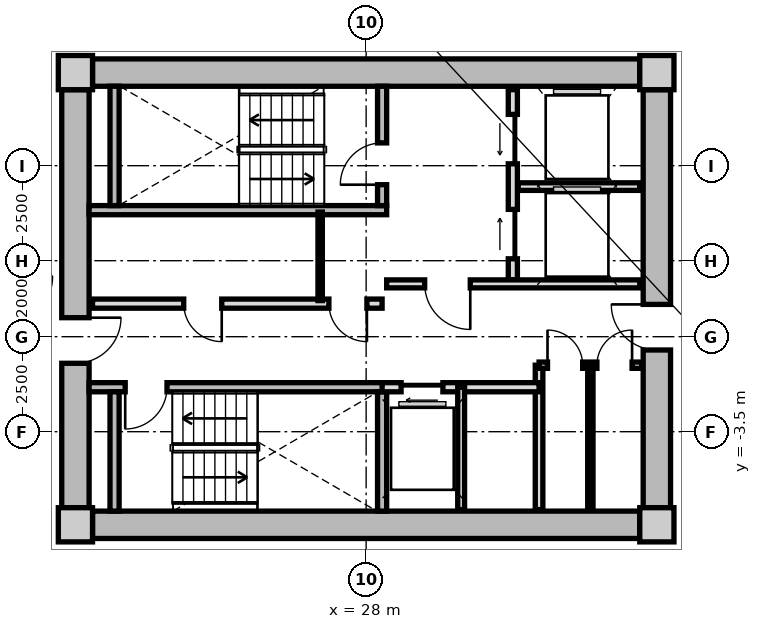
"""IFC4 building model, lengths in metres.
Left out: names, types, materials, properties, quantities, classifications, styles, units other than length and angle.
Written with IfcOpenShell. Run it as: python <this file> out.ifc"""

import sys

from ifc_helpers import new_model, si_unit, direction, frame, frame_2d, origin, origin_2d, place, context, subcontext, project, spatial, rectangle, extrude, source, transform, mapped, element, fill, save


model = new_model("IFC4")
c1 = context("Model", 3, precision=1e-05, world=origin(), true_north=direction((0.0, 1.0)))
c2 = subcontext(c1, "Body", "Model", "MODEL_VIEW")
j1 = project(units=[si_unit("LENGTHUNIT", "METRE"), si_unit("PLANEANGLEUNIT", "RADIAN")], contexts=[c1])
p1 = place(None, origin())
s1 = spatial("IfcSite", under=j1, at=p1, CompositionType="ELEMENT")
p2 = place(p1, origin())
s2 = spatial("IfcBuilding", under=s1, at=p2, CompositionType="ELEMENT")
p3 = place(p2, frame((0.0, 0.0, 90.15)))
s3 = spatial("IfcBuildingStorey", under=s2, at=p3, CompositionType="ELEMENT", Elevation=90.15)
m1 = source(origin(), c2, "Body", "SweptSolid", [
    extrude(rectangle(XDim=0.9, YDim=0.9, at=origin_2d()), origin(), (0.0, 0.0, 1.0), 3.05),
])
for number, where, z_axis, x_axis in (
    (1, (20.35, -5.95, 0.0), (0.0, 0.0, 1.0), (1.0, 0.0, 0.0)),
    (2, (35.65, -5.95, 0.0), (0.0, 0.0, 1.0), (1.0, 0.0, 0.0)),
    (3, (35.65, 5.95, 0.0), (0.0, 0.0, 1.0), (1.0, 0.0, 0.0)),
    (4, (20.35, 5.95, 0.0), (0.0, 0.0, 1.0), (1.0, 0.0, 0.0)),
):
    element("IfcColumn", number, at=place(p3, frame(where, z_axis=z_axis, x_axis=x_axis)), inside=s3, PredefinedType="COLUMN", context=c2, shape_type="MappedRepresentation", body=[
        mapped(m1, transform((0.0, 0.0, 0.0), x_axis=(1.0, 0.0, 0.0), y_axis=(0.0, 1.0, 0.0), z_axis=(0.0, 0.0, 1.0), scale=1.0)),
    ])
m2 = source(origin(), c2, "Body", "SweptSolid", [
    extrude(rectangle(XDim=14.4, YDim=0.72, at=frame_2d((7.2, 0.0))), origin(), (0.0, 0.0, 1.0), 2.79),
])
for number, where, z_axis, x_axis in (
    (5, (20.8, 5.95, 0.0), (0.0, 0.0, 1.0), (1.0, 0.0, 0.0)),
    (6, (35.2, -5.95, 0.0), (0.0, 0.0, 1.0), (-1.0, 0.0, 0.0)),
):
    element("IfcWall", number, at=place(p3, frame(where, z_axis=z_axis, x_axis=x_axis)), inside=s3, PredefinedType="SHEAR", context=c2, shape_type="MappedRepresentation", body=[
        mapped(m2, transform((0.0, 0.0, 0.0), x_axis=(1.0, 0.0, 0.0), y_axis=(0.0, 1.0, 0.0), z_axis=(0.0, 0.0, 1.0), scale=1.0)),
    ])
m3 = source(origin(), c2, "Body", "SweptSolid", [
    extrude(rectangle(XDim=11.0, YDim=0.72, at=frame_2d((5.5, 0.0))), origin(), (0.0, 0.0, 1.0), 2.79),
])
p4 = place(p3, frame((20.35, -5.5, 0.0), z_axis=(0.0, 0.0, 1.0), x_axis=(0.0, 1.0, 0.0)))
e7 = element("IfcWall", 7, at=p4, inside=s3, PredefinedType="SHEAR", context=c2, shape_type="MappedRepresentation", body=[
    mapped(m3, transform((0.0, 0.0, 0.0), x_axis=(1.0, 0.0, 0.0), y_axis=(0.0, 1.0, 0.0), z_axis=(0.0, 0.0, 1.0), scale=1.0)),
])
p5 = place(p4, frame((3.8, 0.0, 0.0)))
e8 = element("IfcOpeningElement", 8, at=p5, cuts=e7, PredefinedType="OPENING", context=c2, shape_type="SweptSolid", body=[
    extrude(rectangle(XDim=1.2, YDim=2.15, at=frame_2d((0.6, 1.075))), frame((0.0, 0.37, 0.0), z_axis=(0.0, -1.0, 0.0), x_axis=(1.0, 0.0, 0.0)), (0.0, 0.0, 1.0), 0.74),
])
p6 = place(p3, frame((35.65, 5.5, 0.0), z_axis=(0.0, 0.0, 1.0), x_axis=(0.0, -1.0, 0.0)))
e9 = element("IfcWall", 9, at=p6, inside=s3, PredefinedType="SHEAR", context=c2, shape_type="MappedRepresentation", body=[
    mapped(m3, transform((0.0, 0.0, 0.0), x_axis=(1.0, 0.0, 0.0), y_axis=(0.0, 1.0, 0.0), z_axis=(0.0, 0.0, 1.0), scale=1.0)),
])
p7 = place(p6, frame((5.65, 0.0, 0.0)))
e10 = element("IfcOpeningElement", 10, at=p7, cuts=e9, PredefinedType="OPENING", context=c2, shape_type="SweptSolid", body=[
    extrude(rectangle(XDim=1.2, YDim=2.15, at=frame_2d((0.6, 1.075))), frame((0.0, 0.37, 0.0), z_axis=(0.0, -1.0, 0.0), x_axis=(1.0, 0.0, 0.0)), (0.0, 0.0, 1.0), 0.74),
])
m4 = source(origin(), c2, "Body", "SweptSolid", [
    extrude(rectangle(XDim=7.83, YDim=0.24, at=frame_2d((3.915, 0.0))), origin(), (0.0, 0.0, 1.0), 2.79),
])
p8 = place(p3, frame((20.71, 2.33, 0.0), z_axis=(0.0, 0.0, 1.0), x_axis=(1.0, 0.0, 0.0)))
e11 = element("IfcWall", 11, at=p8, inside=s3, PredefinedType="PARTITIONING", context=c2, shape_type="MappedRepresentation", body=[
    mapped(m4, transform((0.0, 0.0, 0.0), x_axis=(1.0, 0.0, 0.0), y_axis=(0.0, 1.0, 0.0), z_axis=(0.0, 0.0, 1.0), scale=1.0)),
])
m5 = source(origin(), c2, "Body", "SweptSolid", [
    extrude(rectangle(XDim=3.14, YDim=0.24, at=frame_2d((1.57, 0.0))), origin(), (0.0, 0.0, 1.0), 2.79),
])
p9 = place(p3, frame((21.38, 2.45, 0.0), z_axis=(0.0, 0.0, 1.0), x_axis=(0.0, 1.0, 0.0)))
e12 = element("IfcWall", 12, at=p9, inside=s3, PredefinedType="PARTITIONING", context=c2, shape_type="MappedRepresentation", body=[
    mapped(m5, transform((0.0, 0.0, 0.0), x_axis=(1.0, 0.0, 0.0), y_axis=(0.0, 1.0, 0.0), z_axis=(0.0, 0.0, 1.0), scale=1.0)),
])
p10 = place(p3, frame((28.42, 2.45, 0.0), z_axis=(0.0, 0.0, 1.0), x_axis=(0.0, 1.0, 0.0)))
e13 = element("IfcWall", 13, at=p10, inside=s3, PredefinedType="PARTITIONING", context=c2, shape_type="MappedRepresentation", body=[
    mapped(m5, transform((0.0, 0.0, 0.0), x_axis=(1.0, 0.0, 0.0), y_axis=(0.0, 1.0, 0.0), z_axis=(0.0, 0.0, 1.0), scale=1.0)),
])
p11 = place(p10, frame((0.55, 0.0, 0.0)))
e14 = element("IfcOpeningElement", 14, at=p11, cuts=e13, PredefinedType="OPENING", context=c2, shape_type="SweptSolid", body=[
    extrude(rectangle(XDim=1.1, YDim=2.15, at=frame_2d((0.55, 1.075))), frame((0.0, 0.13, 0.0), z_axis=(0.0, -1.0, 0.0), x_axis=(1.0, 0.0, 0.0)), (0.0, 0.0, 1.0), 0.26),
])
p12 = place(p3, frame((20.71, -2.33, 0.0), z_axis=(0.0, 0.0, 1.0), x_axis=(1.0, 0.0, 0.0)))
e15 = element("IfcWall", 15, at=p12, inside=s3, PredefinedType="PARTITIONING", context=c2, shape_type="MappedRepresentation", body=[
    mapped(m4, transform((0.0, 0.0, 0.0), x_axis=(1.0, 0.0, 0.0), y_axis=(0.0, 1.0, 0.0), z_axis=(0.0, 0.0, 1.0), scale=1.0)),
])
p13 = place(p12, frame((0.95, 0.0, 0.0)))
e16 = element("IfcOpeningElement", 16, at=p13, cuts=e15, PredefinedType="OPENING", context=c2, shape_type="SweptSolid", body=[
    extrude(rectangle(XDim=1.1, YDim=2.15, at=frame_2d((0.55, 1.075))), frame((0.0, 0.13, 0.0), z_axis=(0.0, -1.0, 0.0), x_axis=(1.0, 0.0, 0.0)), (0.0, 0.0, 1.0), 0.26),
])
for number, where, z_axis, x_axis in (
    (17, (21.38, -5.59, 0.0), (0.0, 0.0, 1.0), (0.0, 1.0, 0.0)),
    (18, (28.42, -5.59, 0.0), (0.0, 0.0, 1.0), (0.0, 1.0, 0.0)),
):
    element("IfcWall", number, at=place(p3, frame(where, z_axis=z_axis, x_axis=x_axis)), inside=s3, PredefinedType="PARTITIONING", context=c2, shape_type="MappedRepresentation", body=[
        mapped(m5, transform((0.0, 0.0, 0.0), x_axis=(1.0, 0.0, 0.0), y_axis=(0.0, 1.0, 0.0), z_axis=(0.0, 0.0, 1.0), scale=1.0)),
    ])
m6 = source(origin(), c2, "Body", "SweptSolid", [
    extrude(rectangle(XDim=5.0, YDim=0.24, at=frame_2d((2.5, 0.0))), origin(), (0.0, 0.0, 1.0), 2.775),
])
p14 = place(p3, frame((31.86, 0.5, 0.0), z_axis=(0.0, 0.0, 1.0), x_axis=(0.0, 1.0, 0.0)))
e19 = element("IfcWall", 19, at=p14, inside=s3, PredefinedType="PARTITIONING", context=c2, shape_type="MappedRepresentation", body=[
    mapped(m6, transform((0.0, 0.0, 0.0), x_axis=(1.0, 0.0, 0.0), y_axis=(0.0, 1.0, 0.0), z_axis=(0.0, 0.0, 1.0), scale=1.0)),
])
p15 = place(p14, frame((3.05, 0.0, 0.0)))
e20 = element("IfcOpeningElement", 20, at=p15, cuts=e19, PredefinedType="OPENING", context=c2, shape_type="SweptSolid", body=[
    extrude(rectangle(XDim=1.3, YDim=2.2, at=frame_2d((0.65, 1.1))), frame((0.0, 0.13, 0.0), z_axis=(0.0, -1.0, 0.0), x_axis=(1.0, 0.0, 0.0)), (0.0, 0.0, 1.0), 0.26),
])
p16 = place(p14, frame((0.55, 0.0, 0.0)))
e21 = element("IfcOpeningElement", 21, at=p16, cuts=e19, PredefinedType="OPENING", context=c2, shape_type="SweptSolid", body=[
    extrude(rectangle(XDim=1.3, YDim=2.2, at=frame_2d((0.65, 1.1))), frame((0.0, 0.13, 0.0), z_axis=(0.0, -1.0, 0.0), x_axis=(1.0, 0.0, 0.0)), (0.0, 0.0, 1.0), 0.26),
])
m7 = source(origin(), c2, "Body", "SweptSolid", [
    extrude(rectangle(XDim=3.2, YDim=0.2, at=frame_2d((1.6, 0.0))), origin(), (0.0, 0.0, 1.0), 2.775),
])
p17 = place(p3, frame((32.0, 2.95, 0.0), z_axis=(0.0, 0.0, 1.0), x_axis=(1.0, 0.0, 0.0)))
e22 = element("IfcWall", 22, at=p17, inside=s3, PredefinedType="PARTITIONING", context=c2, shape_type="MappedRepresentation", body=[
    mapped(m7, transform((0.0, 0.0, 0.0), x_axis=(1.0, 0.0, 0.0), y_axis=(0.0, 1.0, 0.0), z_axis=(0.0, 0.0, 1.0), scale=1.0)),
])
m8 = source(origin(), c2, "Body", "SweptSolid", [
    extrude(rectangle(XDim=6.66, YDim=0.21, at=frame_2d((3.33, 0.0))), origin(), (0.0, 0.0, 1.0), 2.775),
])
p18 = place(p3, frame((28.54, 0.39, 0.0), z_axis=(0.0, 0.0, 1.0), x_axis=(1.0, 0.0, 0.0)))
e23 = element("IfcWall", 23, at=p18, inside=s3, PredefinedType="PARTITIONING", context=c2, shape_type="MappedRepresentation", body=[
    mapped(m8, transform((0.0, 0.0, 0.0), x_axis=(1.0, 0.0, 0.0), y_axis=(0.0, 1.0, 0.0), z_axis=(0.0, 0.0, 1.0), scale=1.0)),
])
p19 = place(p18, frame((1.0, 0.0, 0.0)))
e24 = element("IfcOpeningElement", 24, at=p19, cuts=e23, PredefinedType="OPENING", context=c2, shape_type="SweptSolid", body=[
    extrude(rectangle(XDim=1.2, YDim=2.15, at=frame_2d((0.6, 1.075))), frame((0.0, 0.115, 0.0), z_axis=(0.0, -1.0, 0.0), x_axis=(1.0, 0.0, 0.0)), (0.0, 0.0, 1.0), 0.23),
])
m9 = source(origin(), c2, "Body", "SweptSolid", [
    extrude(rectangle(XDim=7.62, YDim=0.24, at=frame_2d((3.81, 0.0))), origin(), (0.0, 0.0, 1.0), 2.775),
])
p20 = place(p3, frame((20.8, -0.13, 0.0), z_axis=(0.0, 0.0, 1.0), x_axis=(1.0, 0.0, 0.0)))
e25 = element("IfcWall", 25, at=p20, inside=s3, PredefinedType="PARTITIONING", context=c2, shape_type="MappedRepresentation", body=[
    mapped(m9, transform((0.0, 0.0, 0.0), x_axis=(1.0, 0.0, 0.0), y_axis=(0.0, 1.0, 0.0), z_axis=(0.0, 0.0, 1.0), scale=1.0)),
])
p21 = place(p20, frame((6.22, 0.0, 0.0)))
e26 = element("IfcOpeningElement", 26, at=p21, cuts=e25, PredefinedType="OPENING", context=c2, shape_type="SweptSolid", body=[
    extrude(rectangle(XDim=1.0, YDim=2.1, at=frame_2d((0.5, 1.05))), frame((0.0, 0.13, 0.0), z_axis=(0.0, -1.0, 0.0), x_axis=(1.0, 0.0, 0.0)), (0.0, 0.0, 1.0), 0.26),
])
p22 = place(p20, frame((2.4, 0.0, 0.0)))
e27 = element("IfcOpeningElement", 27, at=p22, cuts=e25, PredefinedType="OPENING", context=c2, shape_type="SweptSolid", body=[
    extrude(rectangle(XDim=1.0, YDim=2.1, at=frame_2d((0.5, 1.05))), frame((0.0, 0.13, 0.0), z_axis=(0.0, -1.0, 0.0), x_axis=(1.0, 0.0, 0.0)), (0.0, 0.0, 1.0), 0.26),
])
m10 = source(origin(), c2, "Body", "SweptSolid", [
    extrude(rectangle(XDim=2.33, YDim=0.115, at=frame_2d((1.165, 0.0))), origin(), (0.0, 0.0, 1.0), 2.775),
])
p23 = place(p3, frame((26.79, -0.05, 0.0), z_axis=(0.0, 0.0, 1.0), x_axis=(0.0, 1.0, 0.0)))
e28 = element("IfcWall", 28, at=p23, inside=s3, PredefinedType="PARTITIONING", context=c2, shape_type="MappedRepresentation", body=[
    mapped(m10, transform((0.0, 0.0, 0.0), x_axis=(1.0, 0.0, 0.0), y_axis=(0.0, 1.0, 0.0), z_axis=(0.0, 0.0, 1.0), scale=1.0)),
])
m11 = source(origin(), c2, "Body", "SweptSolid", [
    extrude(rectangle(XDim=3.8, YDim=0.2, at=frame_2d((1.9, 0.0))), origin(), (0.0, 0.0, 1.0), 2.775),
])
p24 = place(p3, frame((32.55, -5.55, 0.0), z_axis=(0.0, 0.0, 1.0), x_axis=(0.0, 1.0, 0.0)))
e29 = element("IfcWall", 29, at=p24, inside=s3, PredefinedType="PARTITIONING", context=c2, shape_type="MappedRepresentation", body=[
    mapped(m11, transform((0.0, 0.0, 0.0), x_axis=(1.0, 0.0, 0.0), y_axis=(0.0, 1.0, 0.0), z_axis=(0.0, 0.0, 1.0), scale=1.0)),
])
m12 = source(origin(), c2, "Body", "SweptSolid", [
    extrude(rectangle(XDim=4.13, YDim=0.24, at=frame_2d((2.065, 0.0))), origin(), (0.0, 0.0, 1.0), 2.775),
])
p25 = place(p3, frame((28.42, -2.33, 0.0), z_axis=(0.0, 0.0, 1.0), x_axis=(1.0, 0.0, 0.0)))
e30 = element("IfcWall", 30, at=p25, inside=s3, PredefinedType="PARTITIONING", context=c2, shape_type="MappedRepresentation", body=[
    mapped(m12, transform((0.0, 0.0, 0.0), x_axis=(1.0, 0.0, 0.0), y_axis=(0.0, 1.0, 0.0), z_axis=(0.0, 0.0, 1.0), scale=1.0)),
])
p26 = place(p25, frame((0.5, 0.0, 0.0)))
e31 = element("IfcOpeningElement", 31, at=p26, cuts=e30, PredefinedType="OPENING", context=c2, shape_type="SweptSolid", body=[
    extrude(rectangle(XDim=1.1, YDim=2.2, at=frame_2d((0.55, 1.1))), frame((0.0, 0.13, 0.0), z_axis=(0.0, -1.0, 0.0), x_axis=(1.0, 0.0, 0.0)), (0.0, 0.0, 1.0), 0.26),
])
m13 = source(origin(), c2, "Body", "SweptSolid", [
    extrude(rectangle(XDim=3.22, YDim=0.18, at=frame_2d((1.61, 0.0))), origin(), (0.0, 0.0, 1.0), 2.775),
])
p27 = place(p3, frame((30.5, -5.55, 0.0), z_axis=(0.0, 0.0, 1.0), x_axis=(0.0, 1.0, 0.0)))
e32 = element("IfcWall", 32, at=p27, inside=s3, PredefinedType="PARTITIONING", context=c2, shape_type="MappedRepresentation", body=[
    mapped(m13, transform((0.0, 0.0, 0.0), x_axis=(1.0, 0.0, 0.0), y_axis=(0.0, 1.0, 0.0), z_axis=(0.0, 0.0, 1.0), scale=1.0)),
])
m14 = source(origin(), c2, "Body", "SweptSolid", [
    extrude(rectangle(XDim=2.7, YDim=0.165, at=frame_2d((1.35, 0.0))), origin(), (0.0, 0.0, 1.0), 2.775),
])
p28 = place(p3, frame((32.55, -1.75, 0.0), z_axis=(0.0, 0.0, 1.0), x_axis=(1.0, 0.0, 0.0)))
e33 = element("IfcWall", 33, at=p28, inside=s3, PredefinedType="PARTITIONING", context=c2, shape_type="MappedRepresentation", body=[
    mapped(m14, transform((0.0, 0.0, 0.0), x_axis=(1.0, 0.0, 0.0), y_axis=(0.0, 1.0, 0.0), z_axis=(0.0, 0.0, 1.0), scale=1.0)),
])
p29 = place(p28, frame((0.222, 0.0, 0.0)))
e34 = element("IfcOpeningElement", 34, at=p29, cuts=e33, PredefinedType="OPENING", context=c2, shape_type="SweptSolid", body=[
    extrude(rectangle(XDim=0.925, YDim=2.1, at=frame_2d((0.462, 1.05))), frame((0.0, 0.093, 0.0), z_axis=(0.0, -1.0, 0.0), x_axis=(1.0, 0.0, 0.0)), (0.0, 0.0, 1.0), 0.185),
])
p30 = place(p28, frame((1.522, 0.0, 0.0)))
e35 = element("IfcOpeningElement", 35, at=p30, cuts=e33, PredefinedType="OPENING", context=c2, shape_type="SweptSolid", body=[
    extrude(rectangle(XDim=0.925, YDim=2.1, at=frame_2d((0.462, 1.05))), frame((0.0, 0.093, 0.0), z_axis=(0.0, -1.0, 0.0), x_axis=(1.0, 0.0, 0.0)), (0.0, 0.0, 1.0), 0.185),
])
m15 = source(origin(), c2, "Body", "SweptSolid", [
    extrude(rectangle(XDim=3.8, YDim=0.14, at=frame_2d((1.9, 0.0))), origin(), (0.0, 0.0, 1.0), 2.775),
])
p31 = place(p3, frame((33.9, -5.55, 0.0), z_axis=(0.0, 0.0, 1.0), x_axis=(0.0, 1.0, 0.0)))
e36 = element("IfcWall", 36, at=p31, inside=s3, PredefinedType="PARTITIONING", context=c2, shape_type="MappedRepresentation", body=[
    mapped(m15, transform((0.0, 0.0, 0.0), x_axis=(1.0, 0.0, 0.0), y_axis=(0.0, 1.0, 0.0), z_axis=(0.0, 0.0, 1.0), scale=1.0)),
])
m16 = source(origin(), c2, "Body", "SweptSolid", [
    extrude(rectangle(XDim=1.1, YDim=2.15, at=frame_2d((0.55, 1.075))), frame((0.0, 0.025, 0.0), z_axis=(0.0, -1.0, 0.0), x_axis=(1.0, 0.0, 0.0)), (0.0, 0.0, 1.0), 0.05),
])
p32 = place(p11, origin())
e37 = element("IfcDoor", 37, at=p32, inside=s3, OperationType="SINGLE_SWING_LEFT", PredefinedType="DOOR", context=c2, shape_type="MappedRepresentation", body=[
    mapped(m16, transform((0.0, 0.0, 0.0), x_axis=(1.0, 0.0, 0.0), y_axis=(0.0, 1.0, 0.0), z_axis=(0.0, 0.0, 1.0), scale=1.0)),
])
fill(e14, e37)
p33 = place(p13, frame((1.1, 0.0, 0.0), z_axis=(0.0, 0.0, 1.0), x_axis=(-1.0, 0.0, 0.0)))
e38 = element("IfcDoor", 38, at=p33, inside=s3, OperationType="SINGLE_SWING_RIGHT", PredefinedType="DOOR", context=c2, shape_type="MappedRepresentation", body=[
    mapped(m16, transform((0.0, 0.0, 0.0), x_axis=(1.0, 0.0, 0.0), y_axis=(0.0, 1.0, 0.0), z_axis=(0.0, 0.0, 1.0), scale=1.0)),
])
fill(e16, e38)
m17 = source(origin(), c2, "Body", "SweptSolid", [
    extrude(rectangle(XDim=1.3, YDim=2.2, at=frame_2d((0.65, 1.1))), frame((0.0, 0.025, 0.0), z_axis=(0.0, -1.0, 0.0), x_axis=(1.0, 0.0, 0.0)), (0.0, 0.0, 1.0), 0.05),
])
p34 = place(p15, origin())
e39 = element("IfcDoor", 39, at=p34, inside=s3, OperationType="SLIDING_TO_LEFT", PredefinedType="DOOR", context=c2, shape_type="MappedRepresentation", body=[
    mapped(m17, transform((0.0, 0.0, 0.0), x_axis=(1.0, 0.0, 0.0), y_axis=(0.0, 1.0, 0.0), z_axis=(0.0, 0.0, 1.0), scale=1.0)),
])
fill(e20, e39)
p35 = place(p16, origin())
e40 = element("IfcDoor", 40, at=p35, inside=s3, OperationType="SLIDING_TO_RIGHT", PredefinedType="DOOR", context=c2, shape_type="MappedRepresentation", body=[
    mapped(m17, transform((0.0, 0.0, 0.0), x_axis=(1.0, 0.0, 0.0), y_axis=(0.0, 1.0, 0.0), z_axis=(0.0, 0.0, 1.0), scale=1.0)),
])
fill(e21, e40)
m18 = source(origin(), c2, "Body", "SweptSolid", [
    extrude(rectangle(XDim=1.2, YDim=2.15, at=frame_2d((0.6, 1.075))), frame((0.0, 0.025, 0.0), z_axis=(0.0, -1.0, 0.0), x_axis=(1.0, 0.0, 0.0)), (0.0, 0.0, 1.0), 0.05),
])
p36 = place(p19, frame((1.2, 0.0, 0.0), z_axis=(0.0, 0.0, 1.0), x_axis=(-1.0, 0.0, 0.0)))
e41 = element("IfcDoor", 41, at=p36, inside=s3, OperationType="SINGLE_SWING_LEFT", PredefinedType="DOOR", context=c2, shape_type="MappedRepresentation", body=[
    mapped(m18, transform((0.0, 0.0, 0.0), x_axis=(1.0, 0.0, 0.0), y_axis=(0.0, 1.0, 0.0), z_axis=(0.0, 0.0, 1.0), scale=1.0)),
])
fill(e24, e41)
p37 = place(p5, frame((1.2, 0.0, 0.0), z_axis=(0.0, 0.0, 1.0), x_axis=(-1.0, 0.0, 0.0)))
e42 = element("IfcDoor", 42, at=p37, inside=s3, OperationType="SINGLE_SWING_LEFT", PredefinedType="DOOR", context=c2, shape_type="MappedRepresentation", body=[
    mapped(m18, transform((0.0, 0.0, 0.0), x_axis=(1.0, 0.0, 0.0), y_axis=(0.0, 1.0, 0.0), z_axis=(0.0, 0.0, 1.0), scale=1.0)),
])
fill(e8, e42)
p38 = place(p7, frame((1.2, 0.0, 0.0), z_axis=(0.0, 0.0, 1.0), x_axis=(-1.0, 0.0, 0.0)))
e43 = element("IfcDoor", 43, at=p38, inside=s3, OperationType="SINGLE_SWING_RIGHT", PredefinedType="DOOR", context=c2, shape_type="MappedRepresentation", body=[
    mapped(m18, transform((0.0, 0.0, 0.0), x_axis=(1.0, 0.0, 0.0), y_axis=(0.0, 1.0, 0.0), z_axis=(0.0, 0.0, 1.0), scale=1.0)),
])
fill(e10, e43)
m19 = source(origin(), c2, "Body", "SweptSolid", [
    extrude(rectangle(XDim=1.0, YDim=2.1, at=frame_2d((0.5, 1.05))), frame((0.0, 0.025, 0.0), z_axis=(0.0, -1.0, 0.0), x_axis=(1.0, 0.0, 0.0)), (0.0, 0.0, 1.0), 0.05),
])
p39 = place(p21, frame((1.0, 0.0, 0.0), z_axis=(0.0, 0.0, 1.0), x_axis=(-1.0, 0.0, 0.0)))
e44 = element("IfcDoor", 44, at=p39, inside=s3, OperationType="SINGLE_SWING_LEFT", PredefinedType="DOOR", context=c2, shape_type="MappedRepresentation", body=[
    mapped(m19, transform((0.0, 0.0, 0.0), x_axis=(1.0, 0.0, 0.0), y_axis=(0.0, 1.0, 0.0), z_axis=(0.0, 0.0, 1.0), scale=1.0)),
])
fill(e26, e44)
p40 = place(p22, frame((1.0, 0.0, 0.0), z_axis=(0.0, 0.0, 1.0), x_axis=(-1.0, 0.0, 0.0)))
e45 = element("IfcDoor", 45, at=p40, inside=s3, OperationType="SINGLE_SWING_LEFT", PredefinedType="DOOR", context=c2, shape_type="MappedRepresentation", body=[
    mapped(m19, transform((0.0, 0.0, 0.0), x_axis=(1.0, 0.0, 0.0), y_axis=(0.0, 1.0, 0.0), z_axis=(0.0, 0.0, 1.0), scale=1.0)),
])
fill(e27, e45)
m20 = source(origin(), c2, "Body", "SweptSolid", [
    extrude(rectangle(XDim=1.1, YDim=2.2, at=frame_2d((0.55, 1.1))), frame((0.0, 0.025, 0.0), z_axis=(0.0, -1.0, 0.0), x_axis=(1.0, 0.0, 0.0)), (0.0, 0.0, 1.0), 0.05),
])
p41 = place(p26, frame((1.1, 0.0, 0.0), z_axis=(0.0, 0.0, 1.0), x_axis=(-1.0, 0.0, 0.0)))
e46 = element("IfcDoor", 46, at=p41, inside=s3, OperationType="SLIDING_TO_LEFT", PredefinedType="DOOR", context=c2, shape_type="MappedRepresentation", body=[
    mapped(m20, transform((0.0, 0.0, 0.0), x_axis=(1.0, 0.0, 0.0), y_axis=(0.0, 1.0, 0.0), z_axis=(0.0, 0.0, 1.0), scale=1.0)),
])
fill(e31, e46)
m21 = source(origin(), c2, "Body", "SweptSolid", [
    extrude(rectangle(XDim=0.925, YDim=2.1, at=frame_2d((0.462, 1.05))), frame((0.0, 0.025, 0.0), z_axis=(0.0, -1.0, 0.0), x_axis=(1.0, 0.0, 0.0)), (0.0, 0.0, 1.0), 0.05),
])
p42 = place(p29, origin())
e47 = element("IfcDoor", 47, at=p42, inside=s3, OperationType="SINGLE_SWING_LEFT", PredefinedType="DOOR", context=c2, shape_type="MappedRepresentation", body=[
    mapped(m21, transform((0.0, 0.0, 0.0), x_axis=(1.0, 0.0, 0.0), y_axis=(0.0, 1.0, 0.0), z_axis=(0.0, 0.0, 1.0), scale=1.0)),
])
fill(e34, e47)
p43 = place(p30, origin())
e48 = element("IfcDoor", 48, at=p43, inside=s3, OperationType="SINGLE_SWING_RIGHT", PredefinedType="DOOR", context=c2, shape_type="MappedRepresentation", body=[
    mapped(m21, transform((0.0, 0.0, 0.0), x_axis=(1.0, 0.0, 0.0), y_axis=(0.0, 1.0, 0.0), z_axis=(0.0, 0.0, 1.0), scale=1.0)),
])
fill(e35, e48)
save(model, sys.argv[1])
